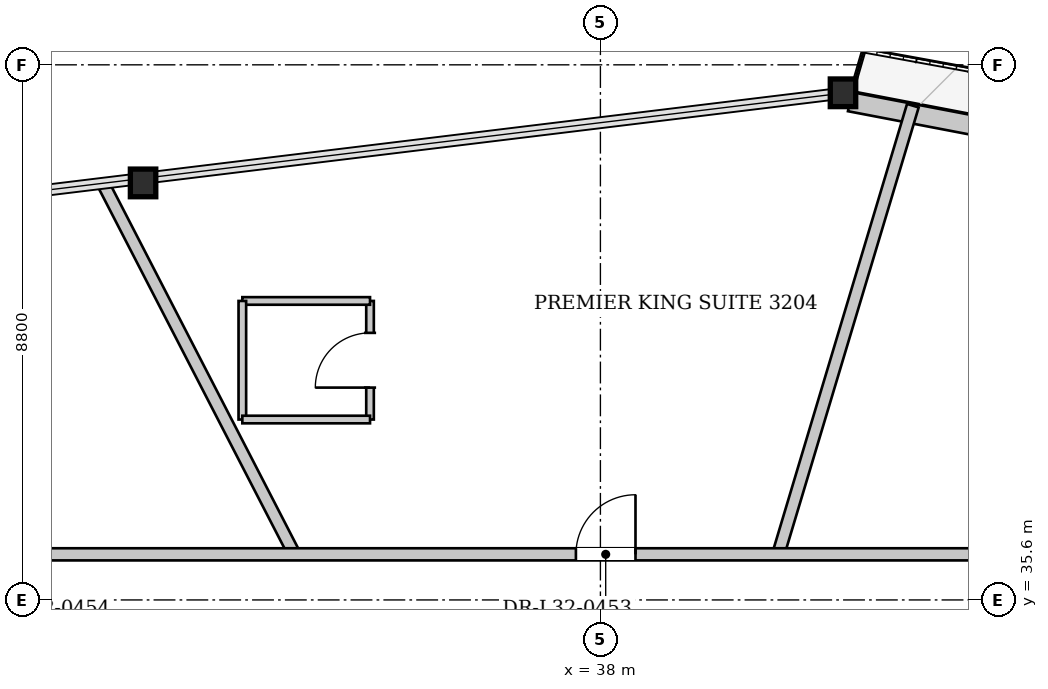
"""IFC4 building model, lengths in metres.
Left out: names, types, materials, properties, quantities, classifications, styles, units other than length and angle.
Written with IfcOpenShell. Run it as: python <this file> out.ifc"""

import sys

from ifc_helpers import new_model, si_unit, direction, frame, frame_2d, origin, origin_2d, place, context, subcontext, project, spatial, rectangle, i_section, extrude, source, transform, mapped, element, fill, save


model = new_model("IFC4")
c1 = context("Model", 3, precision=1e-05, world=origin(), true_north=direction((0.0, 1.0)))
c2 = subcontext(c1, "Body", "Model", "MODEL_VIEW")
j1 = project(units=[si_unit("LENGTHUNIT", "METRE"), si_unit("PLANEANGLEUNIT", "RADIAN")], contexts=[c1])
p1 = place(None, origin())
s1 = spatial("IfcSite", under=j1, at=p1, CompositionType="ELEMENT")
p2 = place(p1, origin())
s2 = spatial("IfcBuilding", under=s1, at=p2, CompositionType="ELEMENT")
p3 = place(p2, frame((0.0, 0.0, 123.45)))
s3 = spatial("IfcBuildingStorey", under=s2, at=p3, CompositionType="ELEMENT", Elevation=123.45)
m1 = source(origin(), c2, "Body", "SweptSolid", [
    extrude(i_section(OverallWidth=0.418, OverallDepth=0.455, WebThickness=0.038, FlangeThickness=0.059, at=origin_2d()), origin(), (0.0, 0.0, 1.0), 3.397),
])
p4 = place(p3, frame((42.132, 43.951, 0.0), z_axis=(-0.083584828026, -0.006755781457, 0.9964777649), x_axis=(0.080562731554, -0.996749540398, 0.0)))
e1 = element("IfcColumn", 1, at=p4, inside=s3, PredefinedType="COLUMN", context=c2, shape_type="MappedRepresentation", body=[
    mapped(m1, transform((0.0, 0.0, 0.0), x_axis=(1.0, 0.0, 0.0), y_axis=(0.0, 1.0, 0.0), z_axis=(0.0, 0.0, 1.0), scale=1.0)),
])
m2 = source(origin(), c2, "Body", "SweptSolid", [
    extrude(i_section(OverallWidth=0.418, OverallDepth=0.455, WebThickness=0.038, FlangeThickness=0.059, at=origin_2d()), origin(), (0.0, 0.0, 1.0), 3.399),
])
p5 = place(p3, frame((30.602, 42.548, 0.0), z_axis=(-0.072908989981, -0.052724333641, 0.995943986287), x_axis=(0.585985969576, -0.810321197711, 0.0)))
e2 = element("IfcColumn", 2, at=p5, inside=s3, PredefinedType="COLUMN", context=c2, shape_type="MappedRepresentation", body=[
    mapped(m2, transform((0.0, 0.0, 0.0), x_axis=(1.0, 0.0, 0.0), y_axis=(0.0, 1.0, 0.0), z_axis=(0.0, 0.0, 1.0), scale=1.0)),
])
p6 = place(p3, frame((42.101, 43.794, 0.0), z_axis=(0.0, 0.0, 1.0), x_axis=(0.982169357398, -0.187998280282, 0.0)))
e3 = element("IfcWall", 3, at=p6, inside=s3, PredefinedType="SOLIDWALL", context=c2, shape_type="SweptSolid", body=[
    extrude(rectangle(XDim=23.229, YDim=0.32, at=frame_2d((11.614, 0.0))), origin(), (0.0, 0.0, 1.0), 2.692),
])
p7 = place(p6, frame((6.883, 0.0, 0.0)))
e4 = element("IfcOpeningElement", 4, at=p7, cuts=e3, PredefinedType="OPENING", context=c2, shape_type="SweptSolid", body=[
    extrude(rectangle(XDim=1.1, YDim=2.3, at=frame_2d((0.55, 1.15))), frame((0.0, 0.17, 0.0), z_axis=(0.0, -1.0, 0.0), x_axis=(1.0, 0.0, 0.0)), (0.0, 0.0, 1.0), 0.34),
])
p8 = place(p6, frame((16.289, 0.0, 0.372)))
e5 = element("IfcOpeningElement", 5, at=p8, cuts=e3, PredefinedType="OPENING", context=c2, shape_type="SweptSolid", body=[
    extrude(rectangle(XDim=1.8, YDim=2.2, at=frame_2d((0.9, 1.1))), frame((0.0, 0.17, 0.0), z_axis=(0.0, -1.0, 0.0), x_axis=(1.0, 0.0, 0.0)), (0.0, 0.0, 1.0), 0.34),
])
p9 = place(p3, frame((40.925, 36.35, 0.0), z_axis=(0.0, 0.0, 1.0), x_axis=(0.287368239357, 0.957820178848, 0.0)))
e6 = element("IfcWall", 6, at=p9, inside=s3, PredefinedType="PARTITIONING", context=c2, shape_type="SweptSolid", body=[
    extrude(rectangle(XDim=7.703, YDim=0.2, at=frame_2d((3.852, 0.0))), origin(), (0.0, 0.0, 1.0), 3.3),
])
p10 = place(p3, frame((32.968, 36.35, 0.0), z_axis=(0.0, 0.0, 1.0), x_axis=(-0.458650198855, 0.88861690007, 0.0)))
e7 = element("IfcWall", 7, at=p10, inside=s3, PredefinedType="PARTITIONING", context=c2, shape_type="SweptSolid", body=[
    extrude(rectangle(XDim=6.835, YDim=0.2, at=frame_2d((3.417, 0.0))), origin(), (0.0, 0.0, 1.0), 3.3),
])
p11 = place(p3, frame((34.211, 38.567, 0.0), z_axis=(0.0, 0.0, 1.0), x_axis=(0.0, 1.0, 0.0)))
e8 = element("IfcWall", 8, at=p11, inside=s3, PredefinedType="PARTITIONING", context=c2, shape_type="SweptSolid", body=[
    extrude(rectangle(XDim=1.95, YDim=0.125, at=frame_2d((0.975, 0.0))), origin(), (0.0, 0.0, 1.0), 3.3),
])
p12 = place(p11, frame((0.525, 0.0, 0.0)))
e9 = element("IfcOpeningElement", 9, at=p12, cuts=e8, PredefinedType="OPENING", context=c2, shape_type="SweptSolid", body=[
    extrude(rectangle(XDim=0.9, YDim=2.1, at=frame_2d((0.45, 1.05))), frame((0.0, 0.073, 0.0), z_axis=(0.0, -1.0, 0.0), x_axis=(1.0, 0.0, 0.0)), (0.0, 0.0, 1.0), 0.145),
])
p13 = place(p3, frame((34.211, 40.517, 0.0), z_axis=(0.0, 0.0, 1.0), x_axis=(-1.0, 0.0, 0.0)))
e10 = element("IfcWall", 10, at=p13, inside=s3, PredefinedType="PARTITIONING", context=c2, shape_type="SweptSolid", body=[
    extrude(rectangle(XDim=2.1, YDim=0.125, at=frame_2d((1.05, 0.0))), origin(), (0.0, 0.0, 1.0), 3.3),
])
p14 = place(p3, frame((32.111, 40.517, 0.0), z_axis=(0.0, 0.0, 1.0), x_axis=(0.0, -1.0, 0.0)))
e11 = element("IfcWall", 11, at=p14, inside=s3, PredefinedType="PARTITIONING", context=c2, shape_type="SweptSolid", body=[
    extrude(rectangle(XDim=1.95, YDim=0.125, at=frame_2d((0.975, 0.0))), origin(), (0.0, 0.0, 1.0), 3.3),
])
p15 = place(p3, frame((32.111, 38.567, 0.0), z_axis=(0.0, 0.0, 1.0), x_axis=(1.0, 0.0, 0.0)))
e12 = element("IfcWall", 12, at=p15, inside=s3, PredefinedType="PARTITIONING", context=c2, shape_type="SweptSolid", body=[
    extrude(rectangle(XDim=2.1, YDim=0.125, at=frame_2d((1.05, 0.0))), origin(), (0.0, 0.0, 1.0), 3.3),
])
p16 = place(p3, frame((27.45, 36.35, 0.0), z_axis=(0.0, 0.0, 1.0), x_axis=(1.0, 0.0, 0.0)))
e13 = element("IfcWall", 13, at=p16, inside=s3, PredefinedType="PARTITIONING", context=c2, shape_type="SweptSolid", body=[
    extrude(rectangle(XDim=21.1, YDim=0.2, at=frame_2d((10.55, 0.0))), origin(), (0.0, 0.0, 1.0), 3.3),
])
p17 = place(p16, frame((19.788, 0.0, 0.0)))
e14 = element("IfcOpeningElement", 14, at=p17, cuts=e13, PredefinedType="OPENING", context=c2, shape_type="SweptSolid", body=[
    extrude(rectangle(XDim=0.98, YDim=2.15, at=frame_2d((0.49, 1.075))), frame((0.0, 0.11, 0.0), z_axis=(0.0, -1.0, 0.0), x_axis=(1.0, 0.0, 0.0)), (0.0, 0.0, 1.0), 0.22),
])
p18 = place(p16, frame((10.147, 0.0, 0.0)))
e15 = element("IfcOpeningElement", 15, at=p18, cuts=e13, PredefinedType="OPENING", context=c2, shape_type="SweptSolid", body=[
    extrude(rectangle(XDim=0.98, YDim=2.15, at=frame_2d((0.49, 1.075))), frame((0.0, 0.11, 0.0), z_axis=(0.0, -1.0, 0.0), x_axis=(1.0, 0.0, 0.0)), (0.0, 0.0, 1.0), 0.22),
])
p19 = place(p16, frame((0.3, 0.0, 0.0)))
e16 = element("IfcOpeningElement", 16, at=p19, cuts=e13, PredefinedType="OPENING", context=c2, shape_type="SweptSolid", body=[
    extrude(rectangle(XDim=0.98, YDim=2.15, at=frame_2d((0.49, 1.075))), frame((0.0, 0.11, 0.0), z_axis=(0.0, -1.0, 0.0), x_axis=(1.0, 0.0, 0.0)), (0.0, 0.0, 1.0), 0.22),
])
m3 = source(origin(), c2, "Body", "SweptSolid", [
    extrude(rectangle(XDim=0.9, YDim=2.1, at=frame_2d((0.45, 1.05))), frame((0.0, 0.025, 0.0), z_axis=(0.0, -1.0, 0.0), x_axis=(1.0, 0.0, 0.0)), (0.0, 0.0, 1.0), 0.05),
])
p20 = place(p12, origin())
e17 = element("IfcDoor", 17, at=p20, inside=s3, OperationType="SINGLE_SWING_LEFT", PredefinedType="DOOR", context=c2, shape_type="MappedRepresentation", body=[
    mapped(m3, transform((0.0, 0.0, 0.0), x_axis=(1.0, 0.0, 0.0), y_axis=(0.0, 1.0, 0.0), z_axis=(0.0, 0.0, 1.0), scale=1.0)),
])
fill(e9, e17)
m4 = source(origin(), c2, "Body", "SweptSolid", [
    extrude(rectangle(XDim=0.98, YDim=2.15, at=frame_2d((0.49, 1.075))), frame((0.0, 0.025, 0.0), z_axis=(0.0, -1.0, 0.0), x_axis=(1.0, 0.0, 0.0)), (0.0, 0.0, 1.0), 0.05),
])
p21 = place(p18, origin())
e18 = element("IfcDoor", 18, at=p21, inside=s3, OperationType="SINGLE_SWING_RIGHT", PredefinedType="DOOR", context=c2, shape_type="MappedRepresentation", body=[
    mapped(m4, transform((0.0, 0.0, 0.0), x_axis=(1.0, 0.0, 0.0), y_axis=(0.0, 1.0, 0.0), z_axis=(0.0, 0.0, 1.0), scale=1.0)),
])
fill(e15, e18)
save(model, sys.argv[1])
